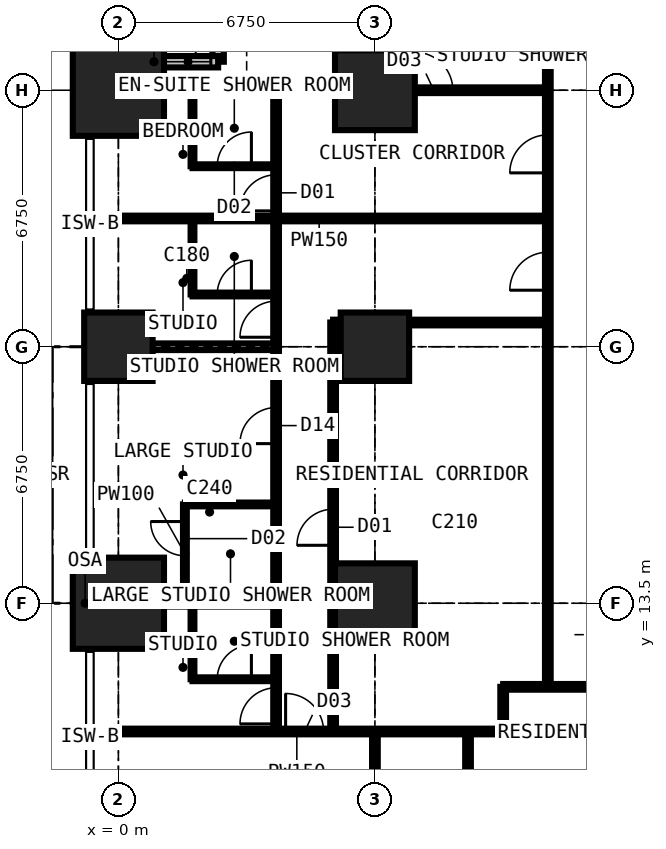
"""IFC4 building model, lengths in metres.
Left out: names, types, materials, properties, quantities, classifications, styles, units other than length and angle.
Written with IfcOpenShell. Run it as: python <this file> out.ifc"""

import sys

from ifc_helpers import new_model, si_unit, direction, frame, frame_2d, origin, origin_2d, place, context, subcontext, project, spatial, rectangle, extrude, element, fill, save


model = new_model("IFC4")
c1 = context("Model", 3, precision=1e-05, world=origin(), true_north=direction((0.0, 1.0)))
c2 = subcontext(c1, "Body", "Model", "MODEL_VIEW")
j1 = project(units=[si_unit("LENGTHUNIT", "METRE"), si_unit("PLANEANGLEUNIT", "RADIAN")], contexts=[c1])
p1 = place(None, origin())
s1 = spatial("IfcSite", under=j1, at=p1, CompositionType="ELEMENT")
p2 = place(p1, origin())
s2 = spatial("IfcBuilding", under=s1, at=p2, CompositionType="ELEMENT")
p3 = place(p2, frame((0.0, 0.0, 83.7)))
s3 = spatial("IfcBuildingStorey", under=s2, at=p3, CompositionType="ELEMENT", Elevation=83.7)
p4 = place(p3, frame((0.0, 13.5, 0.0), z_axis=(0.0, 0.0, 1.0), x_axis=(1.0, 0.0, 0.0)))
e1 = element("IfcColumn", 1, at=p4, inside=s3, PredefinedType="COLUMN", context=c2, shape_type="SweptSolid", body=[
    extrude(rectangle(XDim=2.4, YDim=2.4, at=origin_2d()), origin(), (0.0, 0.0, 1.0), 3.6),
])
p5 = place(p3, frame((0.0, 20.25, 0.0), z_axis=(0.0, 0.0, 1.0), x_axis=(1.0, 0.0, 0.0)))
e2 = element("IfcColumn", 2, at=p5, inside=s3, PredefinedType="COLUMN", context=c2, shape_type="SweptSolid", body=[
    extrude(rectangle(XDim=1.8, YDim=1.8, at=origin_2d()), origin(), (0.0, 0.0, 1.0), 3.6),
])
p6 = place(p3, frame((0.0, 27.0, 0.0), z_axis=(0.0, 0.0, 1.0), x_axis=(1.0, 0.0, 0.0)))
e3 = element("IfcColumn", 3, at=p6, inside=s3, PredefinedType="COLUMN", context=c2, shape_type="SweptSolid", body=[
    extrude(rectangle(XDim=2.4, YDim=2.4, at=origin_2d()), origin(), (0.0, 0.0, 1.0), 3.6),
])
p7 = place(p3, frame((6.75, 13.5, 0.0), z_axis=(0.0, 0.0, 1.0), x_axis=(1.0, 0.0, 0.0)))
e4 = element("IfcColumn", 4, at=p7, inside=s3, PredefinedType="COLUMN", context=c2, shape_type="SweptSolid", body=[
    extrude(rectangle(XDim=2.1, YDim=2.1, at=origin_2d()), origin(), (0.0, 0.0, 1.0), 3.6),
])
p8 = place(p3, frame((6.75, 20.25, 0.0), z_axis=(0.0, 0.0, 1.0), x_axis=(1.0, 0.0, 0.0)))
e5 = element("IfcColumn", 5, at=p8, inside=s3, PredefinedType="COLUMN", context=c2, shape_type="SweptSolid", body=[
    extrude(rectangle(XDim=1.8, YDim=1.8, at=origin_2d()), origin(), (0.0, 0.0, 1.0), 3.6),
])
p9 = place(p3, frame((6.75, 27.0, 0.0), z_axis=(0.0, 0.0, 1.0), x_axis=(1.0, 0.0, 0.0)))
e6 = element("IfcColumn", 6, at=p9, inside=s3, PredefinedType="COLUMN", context=c2, shape_type="SweptSolid", body=[
    extrude(rectangle(XDim=2.1, YDim=2.1, at=origin_2d()), origin(), (0.0, 0.0, 1.0), 3.6),
])
p10 = place(p3, frame((2.625, 31.125, 0.0), z_axis=(0.0, 0.0, 1.0), x_axis=(0.0, -1.0, 0.0)))
e7 = element("IfcWall", 7, at=p10, inside=s3, PredefinedType="SOLIDWALL", context=c2, shape_type="SweptSolid", body=[
    extrude(rectangle(XDim=3.375, YDim=0.3, at=frame_2d((1.688, 0.0))), origin(), (0.0, 0.0, 1.0), 3.375),
])
p11 = place(p10, frame((0.788, 0.0, 0.6)))
e8 = element("IfcOpeningElement", 8, at=p11, cuts=e7, PredefinedType="OPENING", context=c2, shape_type="SweptSolid", body=[
    extrude(rectangle(XDim=1.8, YDim=2.1, at=frame_2d((0.9, 1.05))), frame((0.0, 0.16, 0.0), z_axis=(0.0, -1.0, 0.0), x_axis=(1.0, 0.0, 0.0)), (0.0, 0.0, 1.0), 0.32),
])
p12 = place(p3, frame((2.625, 27.75, 0.0), z_axis=(0.0, 0.0, 1.0), x_axis=(-1.0, 0.0, 0.0)))
e9 = element("IfcWall", 9, at=p12, inside=s3, PredefinedType="SOLIDWALL", context=c2, shape_type="SweptSolid", body=[
    extrude(rectangle(XDim=3.375, YDim=0.3, at=frame_2d((1.688, 0.0))), origin(), (0.0, 0.0, 1.0), 3.375),
])
p13 = place(p12, frame((0.192, 0.0, 0.9)))
e10 = element("IfcOpeningElement", 10, at=p13, cuts=e9, PredefinedType="OPENING", context=c2, shape_type="SweptSolid", body=[
    extrude(rectangle(XDim=1.2, YDim=1.8, at=frame_2d((0.6, 0.9))), frame((0.0, 0.16, 0.0), z_axis=(0.0, -1.0, 0.0), x_axis=(1.0, 0.0, 0.0)), (0.0, 0.0, 1.0), 0.32),
])
p14 = place(p3, frame((-0.734, 10.125, 0.0), z_axis=(0.0, 0.0, 1.0), x_axis=(1.0, 0.0, 0.0)))
e11 = element("IfcWall", 11, at=p14, inside=s3, PredefinedType="PARTITIONING", context=c2, shape_type="SweptSolid", body=[
    extrude(rectangle(XDim=10.859, YDim=0.15, at=frame_2d((5.429, 0.0))), origin(), (0.0, 0.0, 1.0), 3.375),
])
p15 = place(p14, frame((5.134, 0.0, 0.0)))
e12 = element("IfcOpeningElement", 12, at=p15, cuts=e11, PredefinedType="OPENING", context=c2, shape_type="SweptSolid", body=[
    extrude(rectangle(XDim=1.0, YDim=2.2, at=frame_2d((0.5, 1.1))), frame((0.0, 0.085, 0.0), z_axis=(0.0, -1.0, 0.0), x_axis=(1.0, 0.0, 0.0)), (0.0, 0.0, 1.0), 0.17),
])
for number, where, z_axis, x_axis in (
    (13, (-0.734, 13.5, 0.0), (0.0, 0.0, 1.0), (1.0, 0.0, 0.0)),
    (14, (-0.734, 20.25, 0.0), (0.0, 0.0, 1.0), (1.0, 0.0, 0.0)),
):
    element("IfcWall", number, at=place(p3, frame(where, z_axis=z_axis, x_axis=x_axis)), inside=s3, PredefinedType="PARTITIONING", context=c2, shape_type="SweptSolid", body=[
        extrude(rectangle(XDim=4.884, YDim=0.175, at=frame_2d((2.442, 0.0))), origin(), (0.0, 0.0, 1.0), 2.61),
    ])
p16 = place(p3, frame((-0.734, 23.625, 0.0), z_axis=(0.0, 0.0, 1.0), x_axis=(1.0, 0.0, 0.0)))
e15 = element("IfcWall", 15, at=p16, inside=s3, PredefinedType="PARTITIONING", context=c2, shape_type="SweptSolid", body=[
    extrude(rectangle(XDim=12.034, YDim=0.15, at=frame_2d((6.017, 0.0))), origin(), (0.0, 0.0, 1.0), 3.375),
])
p17 = place(p3, frame((-0.734, 27.0, 0.0), z_axis=(0.0, 0.0, 1.0), x_axis=(1.0, 0.0, 0.0)))
e16 = element("IfcWall", 16, at=p17, inside=s3, PredefinedType="PARTITIONING", context=c2, shape_type="SweptSolid", body=[
    extrude(rectangle(XDim=12.034, YDim=0.15, at=frame_2d((6.017, 0.0))), origin(), (0.0, 0.0, 1.0), 2.806),
])
p18 = place(p17, frame((8.534, 0.0, 0.0)))
e17 = element("IfcOpeningElement", 17, at=p18, cuts=e16, PredefinedType="OPENING", context=c2, shape_type="SweptSolid", body=[
    extrude(rectangle(XDim=1.0, YDim=2.2, at=frame_2d((0.5, 1.1))), frame((0.0, 0.085, 0.0), z_axis=(0.0, -1.0, 0.0), x_axis=(1.0, 0.0, 0.0)), (0.0, 0.0, 1.0), 0.17),
])
p19 = place(p3, frame((1.75, 13.5, 0.0), z_axis=(0.0, 0.0, 1.0), x_axis=(0.0, 1.0, 0.0)))
e18 = element("IfcWall", 18, at=p19, inside=s3, PredefinedType="PARTITIONING", context=c2, shape_type="SweptSolid", body=[
    extrude(rectangle(XDim=2.6, YDim=0.1, at=frame_2d((1.3, 0.0))), origin(), (0.0, 0.0, 1.0), 3.375),
])
p20 = place(p19, frame((1.25, 0.0, 0.0)))
e19 = element("IfcOpeningElement", 19, at=p20, cuts=e18, PredefinedType="OPENING", context=c2, shape_type="SweptSolid", body=[
    extrude(rectangle(XDim=0.9, YDim=2.2, at=frame_2d((0.45, 1.1))), frame((0.0, 0.06, 0.0), z_axis=(0.0, -1.0, 0.0), x_axis=(1.0, 0.0, 0.0)), (0.0, 0.0, 1.0), 0.12),
])
p21 = place(p3, frame((1.75, 16.1, 0.0), z_axis=(0.0, 0.0, 1.0), x_axis=(1.0, 0.0, 0.0)))
e20 = element("IfcWall", 20, at=p21, inside=s3, PredefinedType="PARTITIONING", context=c2, shape_type="SweptSolid", body=[
    extrude(rectangle(XDim=2.4, YDim=0.1, at=frame_2d((1.2, 0.0))), origin(), (0.0, 0.0, 1.0), 3.375),
])
p22 = place(p3, frame((1.95, 11.5, 0.0), z_axis=(0.0, 0.0, 1.0), x_axis=(0.0, 1.0, 0.0)))
e21 = element("IfcWall", 21, at=p22, inside=s3, PredefinedType="PARTITIONING", context=c2, shape_type="SweptSolid", body=[
    extrude(rectangle(XDim=2.0, YDim=0.1, at=frame_2d((1.0, 0.0))), origin(), (0.0, 0.0, 1.0), 3.375),
])
p23 = place(p3, frame((1.95, 11.5, 0.0), z_axis=(0.0, 0.0, 1.0), x_axis=(1.0, 0.0, 0.0)))
e22 = element("IfcWall", 22, at=p23, inside=s3, PredefinedType="PARTITIONING", context=c2, shape_type="SweptSolid", body=[
    extrude(rectangle(XDim=2.2, YDim=0.1, at=frame_2d((1.1, 0.0))), origin(), (0.0, 0.0, 1.0), 3.375),
])
p24 = place(p23, frame((0.65, 0.0, 0.0)))
e23 = element("IfcOpeningElement", 23, at=p24, cuts=e22, PredefinedType="OPENING", context=c2, shape_type="SweptSolid", body=[
    extrude(rectangle(XDim=0.9, YDim=2.2, at=frame_2d((0.45, 1.1))), frame((0.0, 0.06, 0.0), z_axis=(0.0, -1.0, 0.0), x_axis=(1.0, 0.0, 0.0)), (0.0, 0.0, 1.0), 0.12),
])
p25 = place(p3, frame((1.95, 21.625, 0.0), z_axis=(0.0, 0.0, 1.0), x_axis=(0.0, 1.0, 0.0)))
e24 = element("IfcWall", 24, at=p25, inside=s3, PredefinedType="PARTITIONING", context=c2, shape_type="SweptSolid", body=[
    extrude(rectangle(XDim=2.0, YDim=0.1, at=frame_2d((1.0, 0.0))), origin(), (0.0, 0.0, 1.0), 3.375),
])
p26 = place(p3, frame((1.95, 21.625, 0.0), z_axis=(0.0, 0.0, 1.0), x_axis=(1.0, 0.0, 0.0)))
e25 = element("IfcWall", 25, at=p26, inside=s3, PredefinedType="PARTITIONING", context=c2, shape_type="SweptSolid", body=[
    extrude(rectangle(XDim=2.2, YDim=0.1, at=frame_2d((1.1, 0.0))), origin(), (0.0, 0.0, 1.0), 3.375),
])
p27 = place(p26, frame((0.65, 0.0, 0.0)))
e26 = element("IfcOpeningElement", 26, at=p27, cuts=e25, PredefinedType="OPENING", context=c2, shape_type="SweptSolid", body=[
    extrude(rectangle(XDim=0.9, YDim=2.2, at=frame_2d((0.45, 1.1))), frame((0.0, 0.06, 0.0), z_axis=(0.0, -1.0, 0.0), x_axis=(1.0, 0.0, 0.0)), (0.0, 0.0, 1.0), 0.12),
])
p28 = place(p3, frame((1.95, 25.0, 0.0), z_axis=(0.0, 0.0, 1.0), x_axis=(0.0, 1.0, 0.0)))
e27 = element("IfcWall", 27, at=p28, inside=s3, PredefinedType="PARTITIONING", context=c2, shape_type="SweptSolid", body=[
    extrude(rectangle(XDim=2.0, YDim=0.1, at=frame_2d((1.0, 0.0))), origin(), (0.0, 0.0, 1.0), 3.375),
])
p29 = place(p3, frame((1.95, 25.0, 0.0), z_axis=(0.0, 0.0, 1.0), x_axis=(1.0, 0.0, 0.0)))
e28 = element("IfcWall", 28, at=p29, inside=s3, PredefinedType="PARTITIONING", context=c2, shape_type="SweptSolid", body=[
    extrude(rectangle(XDim=2.2, YDim=0.1, at=frame_2d((1.1, 0.0))), origin(), (0.0, 0.0, 1.0), 3.375),
])
p30 = place(p29, frame((0.65, 0.0, 0.0)))
e29 = element("IfcOpeningElement", 29, at=p30, cuts=e28, PredefinedType="OPENING", context=c2, shape_type="SweptSolid", body=[
    extrude(rectangle(XDim=0.9, YDim=2.2, at=frame_2d((0.45, 1.1))), frame((0.0, 0.06, 0.0), z_axis=(0.0, -1.0, 0.0), x_axis=(1.0, 0.0, 0.0)), (0.0, 0.0, 1.0), 0.12),
])
p31 = place(p3, frame((4.15, 10.125, 0.0), z_axis=(0.0, 0.0, 1.0), x_axis=(0.0, 1.0, 0.0)))
e30 = element("IfcWall", 30, at=p31, inside=s3, PredefinedType="PARTITIONING", context=c2, shape_type="SweptSolid", body=[
    extrude(rectangle(XDim=16.875, YDim=0.15, at=frame_2d((8.438, 0.0))), origin(), (0.0, 0.0, 1.0), 3.375),
])
p32 = place(p31, frame((13.7, 0.0, 0.0)))
e31 = element("IfcOpeningElement", 31, at=p32, cuts=e30, PredefinedType="OPENING", context=c2, shape_type="SweptSolid", body=[
    extrude(rectangle(XDim=0.95, YDim=2.2, at=frame_2d((0.475, 1.1))), frame((0.0, 0.085, 0.0), z_axis=(0.0, -1.0, 0.0), x_axis=(1.0, 0.0, 0.0)), (0.0, 0.0, 1.0), 0.17),
])
p33 = place(p31, frame((7.575, 0.0, 0.0)))
e32 = element("IfcOpeningElement", 32, at=p33, cuts=e30, PredefinedType="OPENING", context=c2, shape_type="SweptSolid", body=[
    extrude(rectangle(XDim=0.95, YDim=2.2, at=frame_2d((0.475, 1.1))), frame((0.0, 0.085, 0.0), z_axis=(0.0, -1.0, 0.0), x_axis=(1.0, 0.0, 0.0)), (0.0, 0.0, 1.0), 0.17),
])
p34 = place(p31, frame((0.2, 0.0, 0.0)))
e33 = element("IfcOpeningElement", 33, at=p34, cuts=e30, PredefinedType="OPENING", context=c2, shape_type="SweptSolid", body=[
    extrude(rectangle(XDim=0.95, YDim=2.2, at=frame_2d((0.475, 1.1))), frame((0.0, 0.085, 0.0), z_axis=(0.0, -1.0, 0.0), x_axis=(1.0, 0.0, 0.0)), (0.0, 0.0, 1.0), 0.17),
])
p35 = place(p31, frame((10.375, 0.0, 0.0)))
e34 = element("IfcOpeningElement", 34, at=p35, cuts=e30, PredefinedType="OPENING", context=c2, shape_type="SweptSolid", body=[
    extrude(rectangle(XDim=0.95, YDim=2.2, at=frame_2d((0.475, 1.1))), frame((0.0, 0.085, 0.0), z_axis=(0.0, -1.0, 0.0), x_axis=(1.0, 0.0, 0.0)), (0.0, 0.0, 1.0), 0.17),
])
p36 = place(p3, frame((5.65, 10.125, 0.0), z_axis=(0.0, 0.0, 1.0), x_axis=(0.0, 1.0, 0.0)))
e35 = element("IfcWall", 35, at=p36, inside=s3, PredefinedType="PARTITIONING", context=c2, shape_type="SweptSolid", body=[
    extrude(rectangle(XDim=10.762, YDim=0.15, at=frame_2d((5.381, 0.0))), origin(), (0.0, 0.0, 1.0), 3.375),
])
p37 = place(p36, frame((4.9, 0.0, 0.0)))
e36 = element("IfcOpeningElement", 36, at=p37, cuts=e35, PredefinedType="OPENING", context=c2, shape_type="SweptSolid", body=[
    extrude(rectangle(XDim=0.95, YDim=2.2, at=frame_2d((0.475, 1.1))), frame((0.0, 0.085, 0.0), z_axis=(0.0, -1.0, 0.0), x_axis=(1.0, 0.0, 0.0)), (0.0, 0.0, 1.0), 0.17),
])
p38 = place(p3, frame((5.65, 20.887, 0.0), z_axis=(0.0, 0.0, 1.0), x_axis=(1.0, 0.0, 0.0)))
e37 = element("IfcWall", 37, at=p38, inside=s3, PredefinedType="PARTITIONING", context=c2, shape_type="SweptSolid", body=[
    extrude(rectangle(XDim=5.65, YDim=0.15, at=frame_2d((2.825, 0.0))), origin(), (0.0, 0.0, 1.0), 3.375),
])
p39 = place(p3, frame((6.75, -0.734, 0.0), z_axis=(0.0, 0.0, 1.0), x_axis=(0.0, 1.0, 0.0)))
e38 = element("IfcWall", 38, at=p39, inside=s3, PredefinedType="PARTITIONING", context=c2, shape_type="SweptSolid", body=[
    extrude(rectangle(XDim=10.859, YDim=0.15, at=frame_2d((5.429, 0.0))), origin(), (0.0, 0.0, 1.0), 2.877),
])
p40 = place(p3, frame((9.2, 5.65, 0.0), z_axis=(0.0, 0.0, 1.0), x_axis=(0.0, 1.0, 0.0)))
e39 = element("IfcWall", 39, at=p40, inside=s3, PredefinedType="PARTITIONING", context=c2, shape_type="SweptSolid", body=[
    extrude(rectangle(XDim=4.475, YDim=0.15, at=frame_2d((2.238, 0.0))), origin(), (0.0, 0.0, 1.0), 3.375),
])
p41 = place(p3, frame((10.125, 10.125, 0.0), z_axis=(0.0, 0.0, 1.0), x_axis=(0.0, 1.0, 0.0)))
e40 = element("IfcWall", 40, at=p41, inside=s3, PredefinedType="PARTITIONING", context=c2, shape_type="SweptSolid", body=[
    extrude(rectangle(XDim=1.175, YDim=0.15, at=frame_2d((0.587, 0.0))), origin(), (0.0, 0.0, 1.0), 3.375),
])
p42 = place(p3, frame((10.125, 11.3, 0.0), z_axis=(0.0, 0.0, 1.0), x_axis=(1.0, 0.0, 0.0)))
e41 = element("IfcWall", 41, at=p42, inside=s3, PredefinedType="PARTITIONING", context=c2, shape_type="SweptSolid", body=[
    extrude(rectangle(XDim=20.675, YDim=0.15, at=frame_2d((10.337, 0.0))), origin(), (0.0, 0.0, 1.0), 3.375),
])
p43 = place(p42, frame((8.375, 0.0, 0.0)))
e42 = element("IfcOpeningElement", 42, at=p43, cuts=e41, PredefinedType="OPENING", context=c2, shape_type="SweptSolid", body=[
    extrude(rectangle(XDim=1.0, YDim=2.2, at=frame_2d((0.5, 1.1))), frame((0.0, 0.085, 0.0), z_axis=(0.0, -1.0, 0.0), x_axis=(1.0, 0.0, 0.0)), (0.0, 0.0, 1.0), 0.17),
])
p44 = place(p42, frame((10.975, 0.0, 0.0)))
e43 = element("IfcOpeningElement", 43, at=p44, cuts=e41, PredefinedType="OPENING", context=c2, shape_type="SweptSolid", body=[
    extrude(rectangle(XDim=1.0, YDim=2.2, at=frame_2d((0.5, 1.1))), frame((0.0, 0.085, 0.0), z_axis=(0.0, -1.0, 0.0), x_axis=(1.0, 0.0, 0.0)), (0.0, 0.0, 1.0), 0.17),
])
p45 = place(p42, frame((3.925, 0.0, 0.0)))
e44 = element("IfcOpeningElement", 44, at=p45, cuts=e41, PredefinedType="OPENING", context=c2, shape_type="SweptSolid", body=[
    extrude(rectangle(XDim=0.95, YDim=2.2, at=frame_2d((0.475, 1.1))), frame((0.0, 0.085, 0.0), z_axis=(0.0, -1.0, 0.0), x_axis=(1.0, 0.0, 0.0)), (0.0, 0.0, 1.0), 0.17),
])
p46 = place(p3, frame((11.3, 11.3, 0.0), z_axis=(0.0, 0.0, 1.0), x_axis=(0.0, 1.0, 0.0)))
e45 = element("IfcWall", 45, at=p46, inside=s3, PredefinedType="PARTITIONING", context=c2, shape_type="SweptSolid", body=[
    extrude(rectangle(XDim=19.3, YDim=0.15, at=frame_2d((9.65, 0.0))), origin(), (0.0, 0.0, 1.0), 3.375),
])
p47 = place(p46, frame((13.525, 0.0, 0.0)))
e46 = element("IfcOpeningElement", 46, at=p47, cuts=e45, PredefinedType="OPENING", context=c2, shape_type="SweptSolid", body=[
    extrude(rectangle(XDim=1.0, YDim=2.2, at=frame_2d((0.5, 1.1))), frame((0.0, 0.085, 0.0), z_axis=(0.0, -1.0, 0.0), x_axis=(1.0, 0.0, 0.0)), (0.0, 0.0, 1.0), 0.17),
])
p48 = place(p46, frame((10.438, 0.0, 0.0)))
e47 = element("IfcOpeningElement", 47, at=p48, cuts=e45, PredefinedType="OPENING", context=c2, shape_type="SweptSolid", body=[
    extrude(rectangle(XDim=1.0, YDim=2.2, at=frame_2d((0.5, 1.1))), frame((0.0, 0.085, 0.0), z_axis=(0.0, -1.0, 0.0), x_axis=(1.0, 0.0, 0.0)), (0.0, 0.0, 1.0), 0.17),
])
p49 = place(p13, origin())
e48 = element("IfcWindow", 48, at=p49, inside=s3, PartitioningType="SINGLE_PANEL", PredefinedType="WINDOW", context=c2, shape_type="SweptSolid", body=[
    extrude(rectangle(XDim=1.2, YDim=1.8, at=frame_2d((0.6, 0.9))), frame((0.0, 0.03, 0.0), z_axis=(0.0, -1.0, 0.0), x_axis=(1.0, 0.0, 0.0)), (0.0, 0.0, 1.0), 0.06),
])
fill(e10, e48)
p50 = place(p15, origin())
e49 = element("IfcDoor", 49, at=p50, inside=s3, OperationType="SINGLE_SWING_LEFT", PredefinedType="DOOR", context=c2, shape_type="SweptSolid", body=[
    extrude(rectangle(XDim=1.0, YDim=2.2, at=frame_2d((0.5, 1.1))), frame((0.0, 0.025, 0.0), z_axis=(0.0, -1.0, 0.0), x_axis=(1.0, 0.0, 0.0)), (0.0, 0.0, 1.0), 0.05),
])
fill(e12, e49)
p51 = place(p18, origin())
e50 = element("IfcDoor", 50, at=p51, inside=s3, OperationType="SINGLE_SWING_LEFT", PredefinedType="DOOR", context=c2, shape_type="SweptSolid", body=[
    extrude(rectangle(XDim=1.0, YDim=2.2, at=frame_2d((0.5, 1.1))), frame((0.0, 0.025, 0.0), z_axis=(0.0, -1.0, 0.0), x_axis=(1.0, 0.0, 0.0)), (0.0, 0.0, 1.0), 0.05),
])
fill(e17, e50)
p52 = place(p32, origin())
e51 = element("IfcDoor", 51, at=p52, inside=s3, OperationType="SINGLE_SWING_LEFT", PredefinedType="DOOR", context=c2, shape_type="SweptSolid", body=[
    extrude(rectangle(XDim=0.95, YDim=2.2, at=frame_2d((0.475, 1.1))), frame((0.0, 0.025, 0.0), z_axis=(0.0, -1.0, 0.0), x_axis=(1.0, 0.0, 0.0)), (0.0, 0.0, 1.0), 0.05),
])
fill(e31, e51)
p53 = place(p30, origin())
e52 = element("IfcDoor", 52, at=p53, inside=s3, OperationType="SINGLE_SWING_RIGHT", PredefinedType="DOOR", context=c2, shape_type="SweptSolid", body=[
    extrude(rectangle(XDim=0.9, YDim=2.2, at=frame_2d((0.45, 1.1))), frame((0.0, 0.025, 0.0), z_axis=(0.0, -1.0, 0.0), x_axis=(1.0, 0.0, 0.0)), (0.0, 0.0, 1.0), 0.05),
])
fill(e29, e52)
p54 = place(p47, origin())
e53 = element("IfcDoor", 53, at=p54, inside=s3, OperationType="SINGLE_SWING_LEFT", PredefinedType="DOOR", context=c2, shape_type="SweptSolid", body=[
    extrude(rectangle(XDim=1.0, YDim=2.2, at=frame_2d((0.5, 1.1))), frame((0.0, 0.025, 0.0), z_axis=(0.0, -1.0, 0.0), x_axis=(1.0, 0.0, 0.0)), (0.0, 0.0, 1.0), 0.05),
])
fill(e46, e53)
p55 = place(p33, origin())
e54 = element("IfcDoor", 54, at=p55, inside=s3, OperationType="SINGLE_SWING_LEFT", PredefinedType="DOOR", context=c2, shape_type="SweptSolid", body=[
    extrude(rectangle(XDim=0.95, YDim=2.2, at=frame_2d((0.475, 1.1))), frame((0.0, 0.025, 0.0), z_axis=(0.0, -1.0, 0.0), x_axis=(1.0, 0.0, 0.0)), (0.0, 0.0, 1.0), 0.05),
])
fill(e32, e54)
p56 = place(p20, origin())
e55 = element("IfcDoor", 55, at=p56, inside=s3, OperationType="SINGLE_SWING_RIGHT", PredefinedType="DOOR", context=c2, shape_type="SweptSolid", body=[
    extrude(rectangle(XDim=0.9, YDim=2.2, at=frame_2d((0.45, 1.1))), frame((0.0, 0.025, 0.0), z_axis=(0.0, -1.0, 0.0), x_axis=(1.0, 0.0, 0.0)), (0.0, 0.0, 1.0), 0.05),
])
fill(e19, e55)
p57 = place(p34, origin())
e56 = element("IfcDoor", 56, at=p57, inside=s3, OperationType="SINGLE_SWING_LEFT", PredefinedType="DOOR", context=c2, shape_type="SweptSolid", body=[
    extrude(rectangle(XDim=0.95, YDim=2.2, at=frame_2d((0.475, 1.1))), frame((0.0, 0.025, 0.0), z_axis=(0.0, -1.0, 0.0), x_axis=(1.0, 0.0, 0.0)), (0.0, 0.0, 1.0), 0.05),
])
fill(e33, e56)
p58 = place(p24, origin())
e57 = element("IfcDoor", 57, at=p58, inside=s3, OperationType="SINGLE_SWING_RIGHT", PredefinedType="DOOR", context=c2, shape_type="SweptSolid", body=[
    extrude(rectangle(XDim=0.9, YDim=2.2, at=frame_2d((0.45, 1.1))), frame((0.0, 0.025, 0.0), z_axis=(0.0, -1.0, 0.0), x_axis=(1.0, 0.0, 0.0)), (0.0, 0.0, 1.0), 0.05),
])
fill(e23, e57)
p59 = place(p35, origin())
e58 = element("IfcDoor", 58, at=p59, inside=s3, OperationType="SINGLE_SWING_LEFT", PredefinedType="DOOR", context=c2, shape_type="SweptSolid", body=[
    extrude(rectangle(XDim=0.95, YDim=2.2, at=frame_2d((0.475, 1.1))), frame((0.0, 0.025, 0.0), z_axis=(0.0, -1.0, 0.0), x_axis=(1.0, 0.0, 0.0)), (0.0, 0.0, 1.0), 0.05),
])
fill(e34, e58)
p60 = place(p27, origin())
e59 = element("IfcDoor", 59, at=p60, inside=s3, OperationType="SINGLE_SWING_RIGHT", PredefinedType="DOOR", context=c2, shape_type="SweptSolid", body=[
    extrude(rectangle(XDim=0.9, YDim=2.2, at=frame_2d((0.45, 1.1))), frame((0.0, 0.025, 0.0), z_axis=(0.0, -1.0, 0.0), x_axis=(1.0, 0.0, 0.0)), (0.0, 0.0, 1.0), 0.05),
])
fill(e26, e59)
p61 = place(p48, origin())
e60 = element("IfcDoor", 60, at=p61, inside=s3, OperationType="SINGLE_SWING_LEFT", PredefinedType="DOOR", context=c2, shape_type="SweptSolid", body=[
    extrude(rectangle(XDim=1.0, YDim=2.2, at=frame_2d((0.5, 1.1))), frame((0.0, 0.025, 0.0), z_axis=(0.0, -1.0, 0.0), x_axis=(1.0, 0.0, 0.0)), (0.0, 0.0, 1.0), 0.05),
])
fill(e47, e60)
p62 = place(p37, origin())
e61 = element("IfcDoor", 61, at=p62, inside=s3, OperationType="SINGLE_SWING_LEFT", PredefinedType="DOOR", context=c2, shape_type="SweptSolid", body=[
    extrude(rectangle(XDim=0.95, YDim=2.2, at=frame_2d((0.475, 1.1))), frame((0.0, 0.025, 0.0), z_axis=(0.0, -1.0, 0.0), x_axis=(1.0, 0.0, 0.0)), (0.0, 0.0, 1.0), 0.05),
])
fill(e36, e61)
save(model, sys.argv[1])
